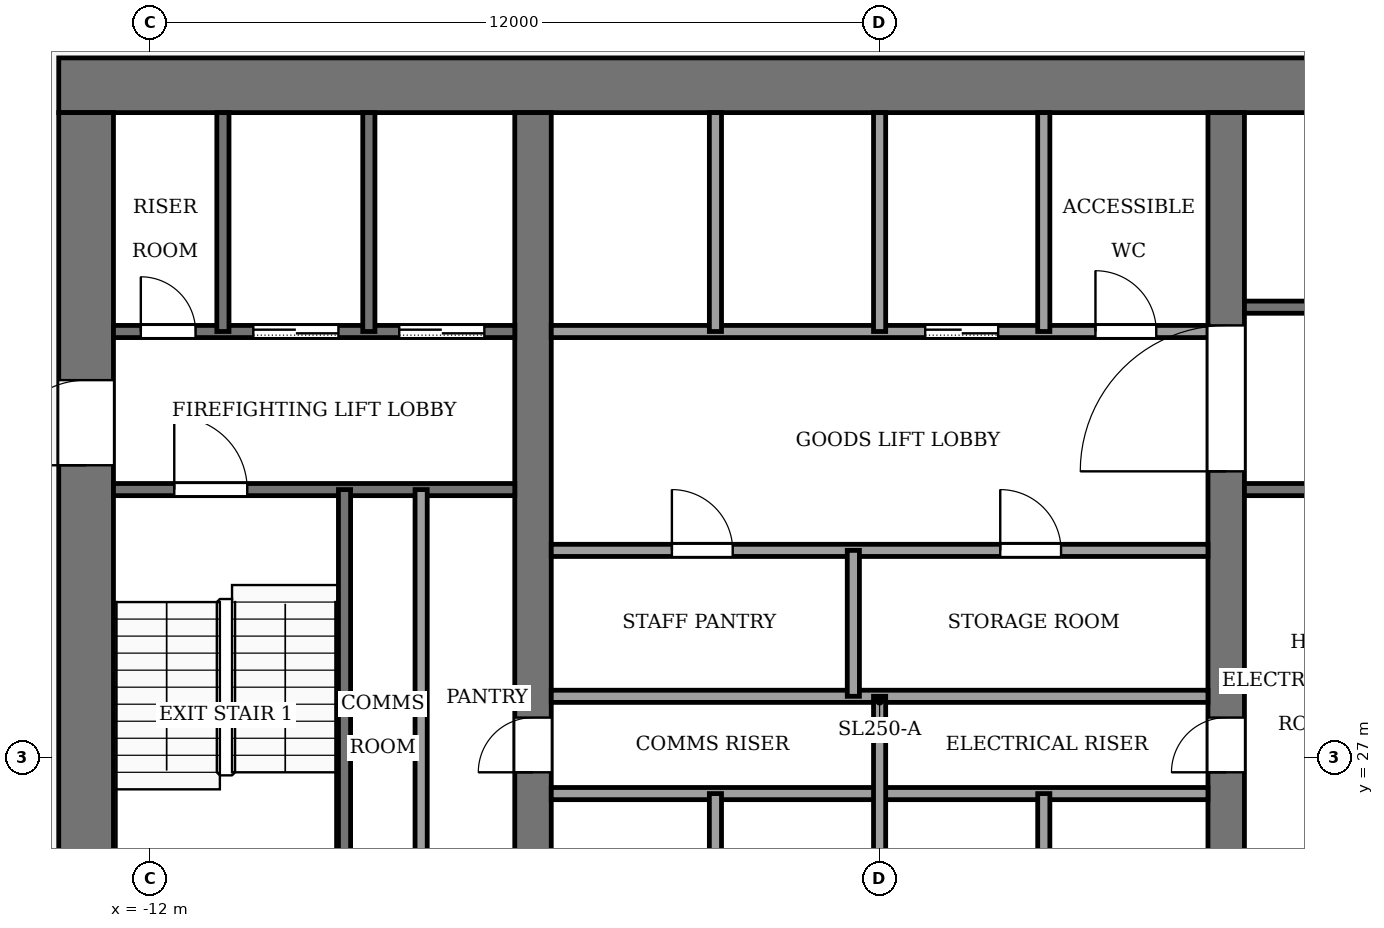
"""IFC4 building model, lengths in metres.
Left out: names, types, materials, properties, quantities, classifications, styles, units other than length and angle.
Written with IfcOpenShell. Run it as: python <this file> out.ifc"""

import sys

from ifc_helpers import new_model, si_unit, direction, frame, frame_2d, origin, place, context, subcontext, project, spatial, rectangle, extrude, element, fill, save


model = new_model("IFC4")
c1 = context("Model", 3, precision=1e-05, world=origin(), true_north=direction((0.0, 1.0)))
c2 = subcontext(c1, "Body", "Model", "MODEL_VIEW")
j1 = project(units=[si_unit("LENGTHUNIT", "METRE"), si_unit("PLANEANGLEUNIT", "RADIAN")], contexts=[c1])
p1 = place(None, origin())
s1 = spatial("IfcSite", under=j1, at=p1, CompositionType="ELEMENT")
p2 = place(p1, origin())
s2 = spatial("IfcBuilding", under=s1, at=p2, CompositionType="ELEMENT")
p3 = place(p2, frame((0.0, 0.0, 202.0)))
s3 = spatial("IfcBuildingStorey", under=s2, at=p3, CompositionType="ELEMENT", Elevation=202.0)
p4 = place(p3, frame((-13.5, 38.05, -0.13), z_axis=(0.0, 0.0, 1.0), x_axis=(1.0, 0.0, 0.0)))
e1 = element("IfcWall", 1, at=p4, inside=s3, PredefinedType="SHEAR", context=c2, shape_type="SweptSolid", body=[
    extrude(rectangle(XDim=27.0, YDim=0.9, at=frame_2d((13.5, 0.0))), origin(), (0.0, 0.0, 1.0), 4.0),
])
p5 = place(p3, frame((-13.05, 18.4, -0.13), z_axis=(0.0, 0.0, 1.0), x_axis=(0.0, 1.0, 0.0)))
e2 = element("IfcWall", 2, at=p5, inside=s3, PredefinedType="SHEAR", context=c2, shape_type="SweptSolid", body=[
    extrude(rectangle(XDim=19.2, YDim=0.9, at=frame_2d((9.6, 0.0))), origin(), (0.0, 0.0, 1.0), 4.0),
])
p6 = place(p5, frame((2.8, 0.0, 0.13)))
e3 = element("IfcOpeningElement", 3, at=p6, cuts=e2, PredefinedType="OPENING", context=c2, shape_type="SweptSolid", body=[
    extrude(rectangle(XDim=2.4, YDim=2.4, at=frame_2d((1.2, 1.2))), frame((0.0, 0.46, 0.0), z_axis=(0.0, -1.0, 0.0), x_axis=(1.0, 0.0, 0.0)), (0.0, 0.0, 1.0), 0.92),
])
p7 = place(p5, frame((13.4, 0.0, 0.13)))
e4 = element("IfcOpeningElement", 4, at=p7, cuts=e2, PredefinedType="OPENING", context=c2, shape_type="SweptSolid", body=[
    extrude(rectangle(XDim=1.4, YDim=2.2, at=frame_2d((0.7, 1.1))), frame((0.0, 0.46, 0.0), z_axis=(0.0, -1.0, 0.0), x_axis=(1.0, 0.0, 0.0)), (0.0, 0.0, 1.0), 0.92),
])
p8 = place(p3, frame((-5.7, 18.4, -0.13), z_axis=(0.0, 0.0, 1.0), x_axis=(0.0, 1.0, 0.0)))
e5 = element("IfcWall", 5, at=p8, inside=s3, PredefinedType="SHEAR", context=c2, shape_type="SweptSolid", body=[
    extrude(rectangle(XDim=19.2, YDim=0.6, at=frame_2d((9.6, 0.0))), origin(), (0.0, 0.0, 1.0), 4.0),
])
p9 = place(p8, frame((8.35, 0.0, 0.13)))
e6 = element("IfcOpeningElement", 6, at=p9, cuts=e5, PredefinedType="OPENING", context=c2, shape_type="SweptSolid", body=[
    extrude(rectangle(XDim=0.9, YDim=2.1, at=frame_2d((0.45, 1.05))), frame((0.0, 0.31, 0.0), z_axis=(0.0, -1.0, 0.0), x_axis=(1.0, 0.0, 0.0)), (0.0, 0.0, 1.0), 0.62),
])
p10 = place(p3, frame((5.7, 18.4, -0.13), z_axis=(0.0, 0.0, 1.0), x_axis=(0.0, 1.0, 0.0)))
e7 = element("IfcWall", 7, at=p10, inside=s3, PredefinedType="SHEAR", context=c2, shape_type="SweptSolid", body=[
    extrude(rectangle(XDim=19.2, YDim=0.6, at=frame_2d((9.6, 0.0))), origin(), (0.0, 0.0, 1.0), 4.0),
])
p11 = place(p10, frame((8.35, 0.0, 0.13)))
e8 = element("IfcOpeningElement", 8, at=p11, cuts=e7, PredefinedType="OPENING", context=c2, shape_type="SweptSolid", body=[
    extrude(rectangle(XDim=0.9, YDim=2.1, at=frame_2d((0.45, 1.05))), frame((0.0, 0.31, 0.0), z_axis=(0.0, -1.0, 0.0), x_axis=(1.0, 0.0, 0.0)), (0.0, 0.0, 1.0), 0.62),
])
p12 = place(p10, frame((13.3, 0.0, 0.13)))
e9 = element("IfcOpeningElement", 9, at=p12, cuts=e7, PredefinedType="OPENING", context=c2, shape_type="SweptSolid", body=[
    extrude(rectangle(XDim=2.4, YDim=2.4, at=frame_2d((1.2, 1.2))), frame((0.0, 0.31, 0.0), z_axis=(0.0, -1.0, 0.0), x_axis=(1.0, 0.0, 0.0)), (0.0, 0.0, 1.0), 0.62),
])
for number, where, z_axis, x_axis in (
    (10, (-5.4, 26.4, 0.0), (0.0, 0.0, 1.0), (1.0, 0.0, 0.0)),
    (11, (-5.4, 28.0, 0.0), (0.0, 0.0, 1.0), (1.0, 0.0, 0.0)),
):
    element("IfcWall", number, at=place(p3, frame(where, z_axis=z_axis, x_axis=x_axis)), inside=s3, PredefinedType="PARTITIONING", context=c2, shape_type="SweptSolid", body=[
        extrude(rectangle(XDim=10.8, YDim=0.2, at=frame_2d((5.4, 0.0))), origin(), (0.0, 0.0, 1.0), 3.87),
    ])
p13 = place(p3, frame((-5.4, 30.4, 0.0), z_axis=(0.0, 0.0, 1.0), x_axis=(1.0, 0.0, 0.0)))
e12 = element("IfcWall", 12, at=p13, inside=s3, PredefinedType="PARTITIONING", context=c2, shape_type="SweptSolid", body=[
    extrude(rectangle(XDim=10.8, YDim=0.2, at=frame_2d((5.4, 0.0))), origin(), (0.0, 0.0, 1.0), 3.87),
])
p14 = place(p13, frame((1.984, 0.0, 0.0)))
e13 = element("IfcOpeningElement", 13, at=p14, cuts=e12, PredefinedType="OPENING", context=c2, shape_type="SweptSolid", body=[
    extrude(rectangle(XDim=1.0, YDim=2.1, at=frame_2d((0.5, 1.05))), frame((0.0, 0.11, 0.0), z_axis=(0.0, -1.0, 0.0), x_axis=(1.0, 0.0, 0.0)), (0.0, 0.0, 1.0), 0.22),
])
p15 = place(p13, frame((7.384, 0.0, 0.0)))
e14 = element("IfcOpeningElement", 14, at=p15, cuts=e12, PredefinedType="OPENING", context=c2, shape_type="SweptSolid", body=[
    extrude(rectangle(XDim=1.0, YDim=2.1, at=frame_2d((0.5, 1.05))), frame((0.0, 0.11, 0.0), z_axis=(0.0, -1.0, 0.0), x_axis=(1.0, 0.0, 0.0)), (0.0, 0.0, 1.0), 0.22),
])
p16 = place(p3, frame((-12.6, 31.4, 0.0), z_axis=(0.0, 0.0, 1.0), x_axis=(1.0, 0.0, 0.0)))
e15 = element("IfcWall", 15, at=p16, inside=s3, PredefinedType="PARTITIONING", context=c2, shape_type="SweptSolid", body=[
    extrude(rectangle(XDim=6.6, YDim=0.2, at=frame_2d((3.3, 0.0))), origin(), (0.0, 0.0, 1.0), 3.87),
])
p17 = place(p16, frame((1.0, 0.0, 0.0)))
e16 = element("IfcOpeningElement", 16, at=p17, cuts=e15, PredefinedType="OPENING", context=c2, shape_type="SweptSolid", body=[
    extrude(rectangle(XDim=1.2, YDim=2.2, at=frame_2d((0.6, 1.1))), frame((0.0, 0.11, 0.0), z_axis=(0.0, -1.0, 0.0), x_axis=(1.0, 0.0, 0.0)), (0.0, 0.0, 1.0), 0.22),
])
p18 = place(p3, frame((6.0, 31.4, 0.0), z_axis=(0.0, 0.0, 1.0), x_axis=(1.0, 0.0, 0.0)))
e17 = element("IfcWall", 17, at=p18, inside=s3, PredefinedType="PARTITIONING", context=c2, shape_type="SweptSolid", body=[
    extrude(rectangle(XDim=6.6, YDim=0.2, at=frame_2d((3.3, 0.0))), origin(), (0.0, 0.0, 1.0), 3.87),
])
p19 = place(p3, frame((-12.6, 34.0, 0.0), z_axis=(0.0, 0.0, 1.0), x_axis=(1.0, 0.0, 0.0)))
e18 = element("IfcWall", 18, at=p19, inside=s3, PredefinedType="PARTITIONING", context=c2, shape_type="SweptSolid", body=[
    extrude(rectangle(XDim=6.6, YDim=0.2, at=frame_2d((3.3, 0.0))), origin(), (0.0, 0.0, 1.0), 3.87),
])
p20 = place(p19, frame((4.7, 0.0, 0.0)))
e19 = element("IfcOpeningElement", 19, at=p20, cuts=e18, PredefinedType="OPENING", context=c2, shape_type="SweptSolid", body=[
    extrude(rectangle(XDim=1.4, YDim=2.2, at=frame_2d((0.7, 1.1))), frame((0.0, 0.11, 0.0), z_axis=(0.0, -1.0, 0.0), x_axis=(1.0, 0.0, 0.0)), (0.0, 0.0, 1.0), 0.22),
])
p21 = place(p19, frame((2.3, 0.0, 0.0)))
e20 = element("IfcOpeningElement", 20, at=p21, cuts=e18, PredefinedType="OPENING", context=c2, shape_type="SweptSolid", body=[
    extrude(rectangle(XDim=1.4, YDim=2.2, at=frame_2d((0.7, 1.1))), frame((0.0, 0.11, 0.0), z_axis=(0.0, -1.0, 0.0), x_axis=(1.0, 0.0, 0.0)), (0.0, 0.0, 1.0), 0.22),
])
p22 = place(p19, frame((0.45, 0.0, 0.0)))
e21 = element("IfcOpeningElement", 21, at=p22, cuts=e18, PredefinedType="OPENING", context=c2, shape_type="SweptSolid", body=[
    extrude(rectangle(XDim=0.9, YDim=2.1, at=frame_2d((0.45, 1.05))), frame((0.0, 0.11, 0.0), z_axis=(0.0, -1.0, 0.0), x_axis=(1.0, 0.0, 0.0)), (0.0, 0.0, 1.0), 0.22),
])
p23 = place(p3, frame((-5.4, 34.0, 0.0), z_axis=(0.0, 0.0, 1.0), x_axis=(1.0, 0.0, 0.0)))
e22 = element("IfcWall", 22, at=p23, inside=s3, PredefinedType="PARTITIONING", context=c2, shape_type="SweptSolid", body=[
    extrude(rectangle(XDim=10.8, YDim=0.2, at=frame_2d((5.4, 0.0))), origin(), (0.0, 0.0, 1.0), 3.87),
])
p24 = place(p23, frame((6.15, 0.0, 0.0)))
e23 = element("IfcOpeningElement", 23, at=p24, cuts=e22, PredefinedType="OPENING", context=c2, shape_type="SweptSolid", body=[
    extrude(rectangle(XDim=1.2, YDim=2.2, at=frame_2d((0.6, 1.1))), frame((0.0, 0.11, 0.0), z_axis=(0.0, -1.0, 0.0), x_axis=(1.0, 0.0, 0.0)), (0.0, 0.0, 1.0), 0.22),
])
p25 = place(p23, frame((8.95, 0.0, 0.0)))
e24 = element("IfcOpeningElement", 24, at=p25, cuts=e22, PredefinedType="OPENING", context=c2, shape_type="SweptSolid", body=[
    extrude(rectangle(XDim=1.0, YDim=2.1, at=frame_2d((0.5, 1.05))), frame((0.0, 0.11, 0.0), z_axis=(0.0, -1.0, 0.0), x_axis=(1.0, 0.0, 0.0)), (0.0, 0.0, 1.0), 0.22),
])
p26 = place(p3, frame((6.0, 34.4, 0.0), z_axis=(0.0, 0.0, 1.0), x_axis=(1.0, 0.0, 0.0)))
e25 = element("IfcWall", 25, at=p26, inside=s3, PredefinedType="PARTITIONING", context=c2, shape_type="SweptSolid", body=[
    extrude(rectangle(XDim=6.6, YDim=0.2, at=frame_2d((3.3, 0.0))), origin(), (0.0, 0.0, 1.0), 3.87),
])
p27 = place(p26, frame((4.8, 0.0, 0.0)))
e26 = element("IfcOpeningElement", 26, at=p27, cuts=e25, PredefinedType="OPENING", context=c2, shape_type="SweptSolid", body=[
    extrude(rectangle(XDim=1.2, YDim=2.2, at=frame_2d((0.6, 1.1))), frame((0.0, 0.11, 0.0), z_axis=(0.0, -1.0, 0.0), x_axis=(1.0, 0.0, 0.0)), (0.0, 0.0, 1.0), 0.22),
])
p28 = place(p3, frame((-10.8, 34.0, 0.0), z_axis=(0.0, 0.0, 1.0), x_axis=(0.0, 1.0, 0.0)))
e27 = element("IfcWall", 27, at=p28, inside=s3, PredefinedType="PARTITIONING", context=c2, shape_type="SweptSolid", body=[
    extrude(rectangle(XDim=3.6, YDim=0.2, at=frame_2d((1.8, 0.0))), origin(), (0.0, 0.0, 1.0), 3.87),
])
p29 = place(p3, frame((-8.8, 24.0, 0.0), z_axis=(0.0, 0.0, 1.0), x_axis=(0.0, 1.0, 0.0)))
e28 = element("IfcWall", 28, at=p29, inside=s3, PredefinedType="PARTITIONING", context=c2, shape_type="SweptSolid", body=[
    extrude(rectangle(XDim=7.4, YDim=0.2, at=frame_2d((3.7, 0.0))), origin(), (0.0, 0.0, 1.0), 3.87),
])
p30 = place(p3, frame((-8.4, 34.0, 0.0), z_axis=(0.0, 0.0, 1.0), x_axis=(0.0, 1.0, 0.0)))
e29 = element("IfcWall", 29, at=p30, inside=s3, PredefinedType="PARTITIONING", context=c2, shape_type="SweptSolid", body=[
    extrude(rectangle(XDim=3.6, YDim=0.2, at=frame_2d((1.8, 0.0))), origin(), (0.0, 0.0, 1.0), 3.87),
])
p31 = place(p3, frame((-7.54, 24.0, 0.0), z_axis=(0.0, 0.0, 1.0), x_axis=(0.0, 1.0, 0.0)))
e30 = element("IfcWall", 30, at=p31, inside=s3, PredefinedType="PARTITIONING", context=c2, shape_type="SweptSolid", body=[
    extrude(rectangle(XDim=7.4, YDim=0.2, at=frame_2d((3.7, 0.0))), origin(), (0.0, 0.0, 1.0), 3.87),
])
p32 = place(p3, frame((-2.7, 24.0, 0.0), z_axis=(0.0, 0.0, 1.0), x_axis=(0.0, 1.0, 0.0)))
e31 = element("IfcWall", 31, at=p32, inside=s3, PredefinedType="PARTITIONING", context=c2, shape_type="SweptSolid", body=[
    extrude(rectangle(XDim=2.4, YDim=0.2, at=frame_2d((1.2, 0.0))), origin(), (0.0, 0.0, 1.0), 3.87),
])
p33 = place(p3, frame((-2.7, 34.0, 0.0), z_axis=(0.0, 0.0, 1.0), x_axis=(0.0, 1.0, 0.0)))
e32 = element("IfcWall", 32, at=p33, inside=s3, PredefinedType="PARTITIONING", context=c2, shape_type="SweptSolid", body=[
    extrude(rectangle(XDim=3.6, YDim=0.2, at=frame_2d((1.8, 0.0))), origin(), (0.0, 0.0, 1.0), 3.87),
])
p34 = place(p3, frame((-0.432, 28.0, 0.0), z_axis=(0.0, 0.0, 1.0), x_axis=(0.0, 1.0, 0.0)))
e33 = element("IfcWall", 33, at=p34, inside=s3, PredefinedType="PARTITIONING", context=c2, shape_type="SweptSolid", body=[
    extrude(rectangle(XDim=2.4, YDim=0.2, at=frame_2d((1.2, 0.0))), origin(), (0.0, 0.0, 1.0), 3.87),
])
p35 = place(p3, frame((0.0, 24.0, 0.0), z_axis=(0.0, 0.0, 1.0), x_axis=(0.0, 1.0, 0.0)))
e34 = element("IfcWall", 34, at=p35, inside=s3, PredefinedType="PARTITIONING", context=c2, shape_type="SweptSolid", body=[
    extrude(rectangle(XDim=4.0, YDim=0.2, at=frame_2d((2.0, 0.0))), origin(), (0.0, 0.0, 1.0), 3.87),
])
p36 = place(p3, frame((0.0, 34.0, 0.0), z_axis=(0.0, 0.0, 1.0), x_axis=(0.0, 1.0, 0.0)))
e35 = element("IfcWall", 35, at=p36, inside=s3, PredefinedType="PARTITIONING", context=c2, shape_type="SweptSolid", body=[
    extrude(rectangle(XDim=3.6, YDim=0.2, at=frame_2d((1.8, 0.0))), origin(), (0.0, 0.0, 1.0), 3.87),
])
p37 = place(p3, frame((2.7, 24.0, 0.0), z_axis=(0.0, 0.0, 1.0), x_axis=(0.0, 1.0, 0.0)))
e36 = element("IfcWall", 36, at=p37, inside=s3, PredefinedType="PARTITIONING", context=c2, shape_type="SweptSolid", body=[
    extrude(rectangle(XDim=2.4, YDim=0.2, at=frame_2d((1.2, 0.0))), origin(), (0.0, 0.0, 1.0), 3.87),
])
p38 = place(p3, frame((2.7, 34.0, 0.0), z_axis=(0.0, 0.0, 1.0), x_axis=(0.0, 1.0, 0.0)))
e37 = element("IfcWall", 37, at=p38, inside=s3, PredefinedType="PARTITIONING", context=c2, shape_type="SweptSolid", body=[
    extrude(rectangle(XDim=3.6, YDim=0.2, at=frame_2d((1.8, 0.0))), origin(), (0.0, 0.0, 1.0), 3.87),
])
p39 = place(p24, origin())
e38 = element("IfcDoor", 38, at=p39, inside=s3, OperationType="SLIDING_TO_LEFT", PredefinedType="DOOR", context=c2, shape_type="SweptSolid", body=[
    extrude(rectangle(XDim=1.2, YDim=2.2, at=frame_2d((0.6, 1.1))), frame((0.0, 0.025, 0.0), z_axis=(0.0, -1.0, 0.0), x_axis=(1.0, 0.0, 0.0)), (0.0, 0.0, 1.0), 0.05),
])
fill(e23, e38)
p40 = place(p20, origin())
e39 = element("IfcDoor", 39, at=p40, inside=s3, OperationType="SLIDING_TO_LEFT", PredefinedType="DOOR", context=c2, shape_type="SweptSolid", body=[
    extrude(rectangle(XDim=1.4, YDim=2.2, at=frame_2d((0.7, 1.1))), frame((0.0, 0.025, 0.0), z_axis=(0.0, -1.0, 0.0), x_axis=(1.0, 0.0, 0.0)), (0.0, 0.0, 1.0), 0.05),
])
fill(e19, e39)
p41 = place(p21, origin())
e40 = element("IfcDoor", 40, at=p41, inside=s3, OperationType="SLIDING_TO_LEFT", PredefinedType="DOOR", context=c2, shape_type="SweptSolid", body=[
    extrude(rectangle(XDim=1.4, YDim=2.2, at=frame_2d((0.7, 1.1))), frame((0.0, 0.025, 0.0), z_axis=(0.0, -1.0, 0.0), x_axis=(1.0, 0.0, 0.0)), (0.0, 0.0, 1.0), 0.05),
])
fill(e20, e40)
p42 = place(p22, origin())
e41 = element("IfcDoor", 41, at=p42, inside=s3, OperationType="SINGLE_SWING_RIGHT", PredefinedType="DOOR", context=c2, shape_type="SweptSolid", body=[
    extrude(rectangle(XDim=0.9, YDim=2.1, at=frame_2d((0.45, 1.05))), frame((0.0, 0.025, 0.0), z_axis=(0.0, -1.0, 0.0), x_axis=(1.0, 0.0, 0.0)), (0.0, 0.0, 1.0), 0.05),
])
fill(e21, e41)
p43 = place(p14, origin())
e42 = element("IfcDoor", 42, at=p43, inside=s3, OperationType="SINGLE_SWING_LEFT", PredefinedType="DOOR", context=c2, shape_type="SweptSolid", body=[
    extrude(rectangle(XDim=1.0, YDim=2.1, at=frame_2d((0.5, 1.05))), frame((0.0, 0.025, 0.0), z_axis=(0.0, -1.0, 0.0), x_axis=(1.0, 0.0, 0.0)), (0.0, 0.0, 1.0), 0.05),
])
fill(e13, e42)
p44 = place(p15, origin())
e43 = element("IfcDoor", 43, at=p44, inside=s3, OperationType="SINGLE_SWING_RIGHT", PredefinedType="DOOR", context=c2, shape_type="SweptSolid", body=[
    extrude(rectangle(XDim=1.0, YDim=2.1, at=frame_2d((0.5, 1.05))), frame((0.0, 0.025, 0.0), z_axis=(0.0, -1.0, 0.0), x_axis=(1.0, 0.0, 0.0)), (0.0, 0.0, 1.0), 0.05),
])
fill(e14, e43)
p45 = place(p25, origin())
e44 = element("IfcDoor", 44, at=p45, inside=s3, OperationType="SINGLE_SWING_LEFT", PredefinedType="DOOR", context=c2, shape_type="SweptSolid", body=[
    extrude(rectangle(XDim=1.0, YDim=2.1, at=frame_2d((0.5, 1.05))), frame((0.0, 0.025, 0.0), z_axis=(0.0, -1.0, 0.0), x_axis=(1.0, 0.0, 0.0)), (0.0, 0.0, 1.0), 0.05),
])
fill(e24, e44)
p46 = place(p9, origin())
e45 = element("IfcDoor", 45, at=p46, inside=s3, OperationType="SINGLE_SWING_RIGHT", PredefinedType="DOOR", context=c2, shape_type="SweptSolid", body=[
    extrude(rectangle(XDim=0.9, YDim=2.1, at=frame_2d((0.45, 1.05))), frame((0.0, 0.025, 0.0), z_axis=(0.0, -1.0, 0.0), x_axis=(1.0, 0.0, 0.0)), (0.0, 0.0, 1.0), 0.05),
])
fill(e6, e45)
p47 = place(p11, origin())
e46 = element("IfcDoor", 46, at=p47, inside=s3, OperationType="SINGLE_SWING_LEFT", PredefinedType="DOOR", context=c2, shape_type="SweptSolid", body=[
    extrude(rectangle(XDim=0.9, YDim=2.1, at=frame_2d((0.45, 1.05))), frame((0.0, 0.025, 0.0), z_axis=(0.0, -1.0, 0.0), x_axis=(1.0, 0.0, 0.0)), (0.0, 0.0, 1.0), 0.05),
])
fill(e8, e46)
p48 = place(p17, origin())
e47 = element("IfcDoor", 47, at=p48, inside=s3, OperationType="SINGLE_SWING_LEFT", PredefinedType="DOOR", context=c2, shape_type="SweptSolid", body=[
    extrude(rectangle(XDim=1.2, YDim=2.2, at=frame_2d((0.6, 1.1))), frame((0.0, 0.025, 0.0), z_axis=(0.0, -1.0, 0.0), x_axis=(1.0, 0.0, 0.0)), (0.0, 0.0, 1.0), 0.05),
])
fill(e16, e47)
p49 = place(p12, origin())
e48 = element("IfcDoor", 48, at=p49, inside=s3, OperationType="DOUBLE_DOOR_SINGLE_SWING", PredefinedType="DOOR", context=c2, shape_type="SweptSolid", body=[
    extrude(rectangle(XDim=2.4, YDim=2.4, at=frame_2d((1.2, 1.2))), frame((0.0, 0.025, 0.0), z_axis=(0.0, -1.0, 0.0), x_axis=(1.0, 0.0, 0.0)), (0.0, 0.0, 1.0), 0.05),
])
fill(e9, e48)
p50 = place(p7, origin())
e49 = element("IfcDoor", 49, at=p50, inside=s3, OperationType="SINGLE_SWING_LEFT", PredefinedType="DOOR", context=c2, shape_type="SweptSolid", body=[
    extrude(rectangle(XDim=1.4, YDim=2.2, at=frame_2d((0.7, 1.1))), frame((0.0, 0.025, 0.0), z_axis=(0.0, -1.0, 0.0), x_axis=(1.0, 0.0, 0.0)), (0.0, 0.0, 1.0), 0.05),
])
fill(e4, e49)
save(model, sys.argv[1])
